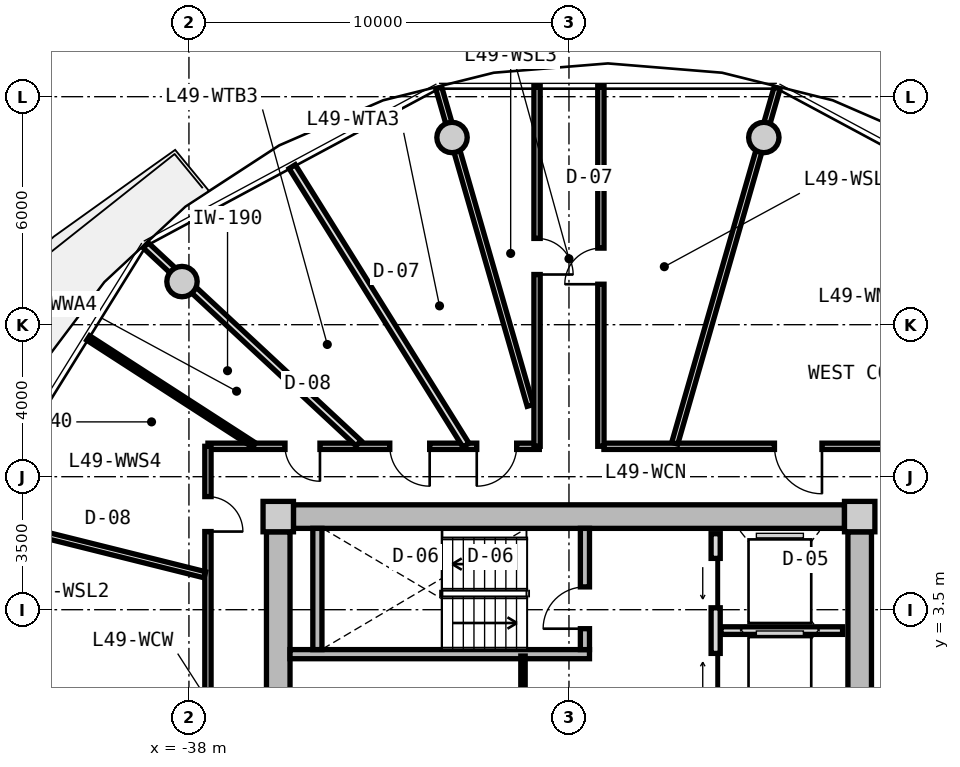
"""IFC4 building model, lengths in metres.
Left out: names, types, materials, properties, quantities, classifications, styles, units other than length and angle.
Written with IfcOpenShell. Run it as: python <this file> out.ifc"""

import sys

from ifc_helpers import new_model, si_unit, direction, frame, frame_2d, origin, origin_2d, place, context, subcontext, project, spatial, rectangle, circle, extrude, source, transform, mapped, element, fill, save


model = new_model("IFC4")
c1 = context("Model", 3, precision=1e-05, world=origin(), true_north=direction((0.0, 1.0)))
c2 = subcontext(c1, "Body", "Model", "MODEL_VIEW")
j1 = project(units=[si_unit("LENGTHUNIT", "METRE"), si_unit("PLANEANGLEUNIT", "RADIAN")], contexts=[c1])
p1 = place(None, origin())
s1 = spatial("IfcSite", under=j1, at=p1, CompositionType="ELEMENT")
p2 = place(p1, origin())
s2 = spatial("IfcBuilding", under=s1, at=p2, CompositionType="ELEMENT")
p3 = place(p2, frame((0.0, 0.0, 158.7)))
s3 = spatial("IfcBuildingStorey", under=s2, at=p3, CompositionType="ELEMENT", Elevation=158.7)
m1 = source(origin(), c2, "Body", "SweptSolid", [
    extrude(rectangle(XDim=0.8, YDim=0.8, at=origin_2d()), origin(), (0.0, 0.0, 1.0), 3.05),
])
for number, where, z_axis, x_axis in (
    (1, (-20.35, 5.95, 0.0), (0.0, 0.0, 1.0), (1.0, 0.0, 0.0)),
    (2, (-35.65, 5.95, 0.0), (0.0, 0.0, 1.0), (1.0, 0.0, 0.0)),
):
    element("IfcColumn", number, at=place(p3, frame(where, z_axis=z_axis, x_axis=x_axis)), inside=s3, PredefinedType="COLUMN", context=c2, shape_type="MappedRepresentation", body=[
        mapped(m1, transform((0.0, 0.0, 0.0), x_axis=(1.0, 0.0, 0.0), y_axis=(0.0, 1.0, 0.0), z_axis=(0.0, 0.0, 1.0), scale=1.0)),
    ])
m2 = source(origin(), c2, "Body", "SweptSolid", [
    extrude(rectangle(XDim=14.5, YDim=0.62, at=frame_2d((7.25, 0.0))), origin(), (0.0, 0.0, 1.0), 2.81),
])
p4 = place(p3, frame((-35.25, 5.95, 0.0), z_axis=(0.0, 0.0, 1.0), x_axis=(1.0, 0.0, 0.0)))
e3 = element("IfcWall", 3, at=p4, inside=s3, PredefinedType="SHEAR", context=c2, shape_type="MappedRepresentation", body=[
    mapped(m2, transform((0.0, 0.0, 0.0), x_axis=(1.0, 0.0, 0.0), y_axis=(0.0, 1.0, 0.0), z_axis=(0.0, 0.0, 1.0), scale=1.0)),
])
m3 = source(origin(), c2, "Body", "SweptSolid", [
    extrude(rectangle(XDim=11.1, YDim=0.62, at=frame_2d((5.55, 0.0))), origin(), (0.0, 0.0, 1.0), 2.81),
])
p5 = place(p3, frame((-35.65, -5.55, 0.0), z_axis=(0.0, 0.0, 1.0), x_axis=(0.0, 1.0, 0.0)))
e4 = element("IfcWall", 4, at=p5, inside=s3, PredefinedType="SHEAR", context=c2, shape_type="MappedRepresentation", body=[
    mapped(m3, transform((0.0, 0.0, 0.0), x_axis=(1.0, 0.0, 0.0), y_axis=(0.0, 1.0, 0.0), z_axis=(0.0, 0.0, 1.0), scale=1.0)),
])
p6 = place(p5, frame((3.8, 0.0, 0.0)))
e5 = element("IfcOpeningElement", 5, at=p6, cuts=e4, PredefinedType="OPENING", context=c2, shape_type="SweptSolid", body=[
    extrude(rectangle(XDim=1.2, YDim=2.15, at=frame_2d((0.6, 1.075))), frame((0.0, 0.32, 0.0), z_axis=(0.0, -1.0, 0.0), x_axis=(1.0, 0.0, 0.0)), (0.0, 0.0, 1.0), 0.64),
])
p7 = place(p3, frame((-20.35, 5.55, 0.0), z_axis=(0.0, 0.0, 1.0), x_axis=(0.0, -1.0, 0.0)))
e6 = element("IfcWall", 6, at=p7, inside=s3, PredefinedType="SHEAR", context=c2, shape_type="MappedRepresentation", body=[
    mapped(m3, transform((0.0, 0.0, 0.0), x_axis=(1.0, 0.0, 0.0), y_axis=(0.0, 1.0, 0.0), z_axis=(0.0, 0.0, 1.0), scale=1.0)),
])
p8 = place(p7, frame((5.65, 0.0, 0.0)))
e7 = element("IfcOpeningElement", 7, at=p8, cuts=e6, PredefinedType="OPENING", context=c2, shape_type="SweptSolid", body=[
    extrude(rectangle(XDim=1.2, YDim=2.15, at=frame_2d((0.6, 1.075))), frame((0.0, 0.32, 0.0), z_axis=(0.0, -1.0, 0.0), x_axis=(1.0, 0.0, 0.0)), (0.0, 0.0, 1.0), 0.64),
])
m4 = source(origin(), c2, "Body", "SweptSolid", [
    extrude(circle(Radius=0.4, at=origin_2d()), origin(), (0.0, 0.0, 1.0), 3.05),
])
for number, where, z_axis, x_axis in (
    (8, (-22.873, 15.926, 0.0), (0.0, 0.0, 1.0), (1.0, 0.0, 0.0)),
    (9, (-31.077, 15.926, 0.0), (0.0, 0.0, 1.0), (1.0, 0.0, 0.0)),
    (10, (-38.183, 12.135, 0.0), (0.0, 0.0, 1.0), (1.0, 0.0, 0.0)),
):
    element("IfcColumn", number, at=place(p3, frame(where, z_axis=z_axis, x_axis=x_axis)), inside=s3, PredefinedType="COLUMN", context=c2, shape_type="MappedRepresentation", body=[
        mapped(m4, transform((0.0, 0.0, 0.0), x_axis=(1.0, 0.0, 0.0), y_axis=(0.0, 1.0, 0.0), z_axis=(0.0, 0.0, 1.0), scale=1.0)),
    ])
m5 = source(origin(), c2, "Body", "SweptSolid", [
    extrude(rectangle(XDim=7.88, YDim=0.24, at=frame_2d((3.94, 0.0))), origin(), (0.0, 0.0, 1.0), 2.81),
])
p9 = place(p3, frame((-35.34, 2.33, 0.0), z_axis=(0.0, 0.0, 1.0), x_axis=(1.0, 0.0, 0.0)))
e11 = element("IfcWall", 11, at=p9, inside=s3, PredefinedType="PARTITIONING", context=c2, shape_type="MappedRepresentation", body=[
    mapped(m5, transform((0.0, 0.0, 0.0), x_axis=(1.0, 0.0, 0.0), y_axis=(0.0, 1.0, 0.0), z_axis=(0.0, 0.0, 1.0), scale=1.0)),
])
m6 = source(origin(), c2, "Body", "SweptSolid", [
    extrude(rectangle(XDim=3.19, YDim=0.24, at=frame_2d((1.595, 0.0))), origin(), (0.0, 0.0, 1.0), 2.81),
])
p10 = place(p3, frame((-34.62, 2.45, 0.0), z_axis=(0.0, 0.0, 1.0), x_axis=(0.0, 1.0, 0.0)))
e12 = element("IfcWall", 12, at=p10, inside=s3, PredefinedType="PARTITIONING", context=c2, shape_type="MappedRepresentation", body=[
    mapped(m6, transform((0.0, 0.0, 0.0), x_axis=(1.0, 0.0, 0.0), y_axis=(0.0, 1.0, 0.0), z_axis=(0.0, 0.0, 1.0), scale=1.0)),
])
p11 = place(p3, frame((-27.58, 2.45, 0.0), z_axis=(0.0, 0.0, 1.0), x_axis=(0.0, 1.0, 0.0)))
e13 = element("IfcWall", 13, at=p11, inside=s3, PredefinedType="PARTITIONING", context=c2, shape_type="MappedRepresentation", body=[
    mapped(m6, transform((0.0, 0.0, 0.0), x_axis=(1.0, 0.0, 0.0), y_axis=(0.0, 1.0, 0.0), z_axis=(0.0, 0.0, 1.0), scale=1.0)),
])
p12 = place(p11, frame((0.55, 0.0, 0.0)))
e14 = element("IfcOpeningElement", 14, at=p12, cuts=e13, PredefinedType="OPENING", context=c2, shape_type="SweptSolid", body=[
    extrude(rectangle(XDim=1.1, YDim=2.15, at=frame_2d((0.55, 1.075))), frame((0.0, 0.13, 0.0), z_axis=(0.0, -1.0, 0.0), x_axis=(1.0, 0.0, 0.0)), (0.0, 0.0, 1.0), 0.26),
])
m7 = source(origin(), c2, "Body", "SweptSolid", [
    extrude(rectangle(XDim=5.0, YDim=0.24, at=frame_2d((2.5, 0.0))), origin(), (0.0, 0.0, 1.0), 2.795),
])
p13 = place(p3, frame((-24.14, 0.5, 0.0), z_axis=(0.0, 0.0, 1.0), x_axis=(0.0, 1.0, 0.0)))
e15 = element("IfcWall", 15, at=p13, inside=s3, PredefinedType="PARTITIONING", context=c2, shape_type="MappedRepresentation", body=[
    mapped(m7, transform((0.0, 0.0, 0.0), x_axis=(1.0, 0.0, 0.0), y_axis=(0.0, 1.0, 0.0), z_axis=(0.0, 0.0, 1.0), scale=1.0)),
])
p14 = place(p13, frame((3.05, 0.0, 0.0)))
e16 = element("IfcOpeningElement", 16, at=p14, cuts=e15, PredefinedType="OPENING", context=c2, shape_type="SweptSolid", body=[
    extrude(rectangle(XDim=1.3, YDim=2.2, at=frame_2d((0.65, 1.1))), frame((0.0, 0.13, 0.0), z_axis=(0.0, -1.0, 0.0), x_axis=(1.0, 0.0, 0.0)), (0.0, 0.0, 1.0), 0.26),
])
p15 = place(p13, frame((0.55, 0.0, 0.0)))
e17 = element("IfcOpeningElement", 17, at=p15, cuts=e15, PredefinedType="OPENING", context=c2, shape_type="SweptSolid", body=[
    extrude(rectangle(XDim=1.3, YDim=2.2, at=frame_2d((0.65, 1.1))), frame((0.0, 0.13, 0.0), z_axis=(0.0, -1.0, 0.0), x_axis=(1.0, 0.0, 0.0)), (0.0, 0.0, 1.0), 0.26),
])
m8 = source(origin(), c2, "Body", "SweptSolid", [
    extrude(rectangle(XDim=3.2, YDim=0.2, at=frame_2d((1.6, 0.0))), origin(), (0.0, 0.0, 1.0), 2.795),
])
p16 = place(p3, frame((-24.0, 2.95, 0.0), z_axis=(0.0, 0.0, 1.0), x_axis=(1.0, 0.0, 0.0)))
e18 = element("IfcWall", 18, at=p16, inside=s3, PredefinedType="PARTITIONING", context=c2, shape_type="MappedRepresentation", body=[
    mapped(m8, transform((0.0, 0.0, 0.0), x_axis=(1.0, 0.0, 0.0), y_axis=(0.0, 1.0, 0.0), z_axis=(0.0, 0.0, 1.0), scale=1.0)),
])
m9 = source(origin(), c2, "Body", "SweptSolid", [
    extrude(rectangle(XDim=2.33, YDim=0.115, at=frame_2d((1.165, 0.0))), origin(), (0.0, 0.0, 1.0), 2.795),
])
p17 = place(p3, frame((-29.21, -0.05, 0.0), z_axis=(0.0, 0.0, 1.0), x_axis=(0.0, 1.0, 0.0)))
e19 = element("IfcWall", 19, at=p17, inside=s3, PredefinedType="PARTITIONING", context=c2, shape_type="MappedRepresentation", body=[
    mapped(m9, transform((0.0, 0.0, 0.0), x_axis=(1.0, 0.0, 0.0), y_axis=(0.0, 1.0, 0.0), z_axis=(0.0, 0.0, 1.0), scale=1.0)),
])
m10 = source(origin(), c2, "Body", "SweptSolid", [
    extrude(rectangle(XDim=8.719, YDim=0.165, at=frame_2d((4.36, 0.0))), origin(), (0.0, 0.0, 1.0), 2.795),
])
p18 = place(p3, frame((-37.5, 7.8, 0.0), z_axis=(0.0, 0.0, 1.0), x_axis=(1.0, 0.0, 0.0)))
e20 = element("IfcWall", 20, at=p18, inside=s3, PredefinedType="PARTITIONING", context=c2, shape_type="MappedRepresentation", body=[
    mapped(m10, transform((0.0, 0.0, 0.0), x_axis=(1.0, 0.0, 0.0), y_axis=(0.0, 1.0, 0.0), z_axis=(0.0, 0.0, 1.0), scale=1.0)),
])
p19 = place(p18, frame((7.073, 0.0, 0.0)))
e21 = element("IfcOpeningElement", 21, at=p19, cuts=e20, PredefinedType="OPENING", context=c2, shape_type="SweptSolid", body=[
    extrude(rectangle(XDim=1.05, YDim=2.15, at=frame_2d((0.525, 1.075))), frame((0.0, 0.093, 0.0), z_axis=(0.0, -1.0, 0.0), x_axis=(1.0, 0.0, 0.0)), (0.0, 0.0, 1.0), 0.185),
])
p20 = place(p18, frame((4.785, 0.0, 0.0)))
e22 = element("IfcOpeningElement", 22, at=p20, cuts=e20, PredefinedType="OPENING", context=c2, shape_type="SweptSolid", body=[
    extrude(rectangle(XDim=1.05, YDim=2.15, at=frame_2d((0.525, 1.075))), frame((0.0, 0.093, 0.0), z_axis=(0.0, -1.0, 0.0), x_axis=(1.0, 0.0, 0.0)), (0.0, 0.0, 1.0), 0.185),
])
p21 = place(p18, frame((2.028, 0.0, 0.0)))
e23 = element("IfcOpeningElement", 23, at=p21, cuts=e20, PredefinedType="OPENING", context=c2, shape_type="SweptSolid", body=[
    extrude(rectangle(XDim=0.92, YDim=2.1, at=frame_2d((0.46, 1.05))), frame((0.0, 0.093, 0.0), z_axis=(0.0, -1.0, 0.0), x_axis=(1.0, 0.0, 0.0)), (0.0, 0.0, 1.0), 0.185),
])
m11 = source(origin(), c2, "Body", "SweptSolid", [
    extrude(rectangle(XDim=8.58, YDim=0.165, at=frame_2d((4.29, 0.0))), origin(), (0.0, 0.0, 1.0), 2.795),
])
p22 = place(p3, frame((-27.08, 7.8, 0.0), z_axis=(0.0, 0.0, 1.0), x_axis=(1.0, 0.0, 0.0)))
e24 = element("IfcWall", 24, at=p22, inside=s3, PredefinedType="PARTITIONING", context=c2, shape_type="MappedRepresentation", body=[
    mapped(m11, transform((0.0, 0.0, 0.0), x_axis=(1.0, 0.0, 0.0), y_axis=(0.0, 1.0, 0.0), z_axis=(0.0, 0.0, 1.0), scale=1.0)),
])
p23 = place(p22, frame((4.487, 0.0, 0.0)))
e25 = element("IfcOpeningElement", 25, at=p23, cuts=e24, PredefinedType="OPENING", context=c2, shape_type="SweptSolid", body=[
    extrude(rectangle(XDim=1.25, YDim=2.2, at=frame_2d((0.625, 1.1))), frame((0.0, 0.093, 0.0), z_axis=(0.0, -1.0, 0.0), x_axis=(1.0, 0.0, 0.0)), (0.0, 0.0, 1.0), 0.185),
])
m12 = source(origin(), c2, "Body", "SweptSolid", [
    extrude(rectangle(XDim=6.88, YDim=0.165, at=frame_2d((3.44, 0.0))), origin(), (0.0, 0.0, 1.0), 2.795),
])
p24 = place(p3, frame((-37.5, 0.92, 0.0), z_axis=(0.0, 0.0, 1.0), x_axis=(0.0, 1.0, 0.0)))
e26 = element("IfcWall", 26, at=p24, inside=s3, PredefinedType="PARTITIONING", context=c2, shape_type="MappedRepresentation", body=[
    mapped(m12, transform((0.0, 0.0, 0.0), x_axis=(1.0, 0.0, 0.0), y_axis=(0.0, 1.0, 0.0), z_axis=(0.0, 0.0, 1.0), scale=1.0)),
])
p25 = place(p24, frame((4.636, 0.0, 0.0)))
e27 = element("IfcOpeningElement", 27, at=p25, cuts=e26, PredefinedType="OPENING", context=c2, shape_type="SweptSolid", body=[
    extrude(rectangle(XDim=0.92, YDim=2.1, at=frame_2d((0.46, 1.05))), frame((0.0, 0.093, 0.0), z_axis=(0.0, -1.0, 0.0), x_axis=(1.0, 0.0, 0.0)), (0.0, 0.0, 1.0), 0.185),
])
m13 = source(origin(), c2, "Body", "SweptSolid", [
    extrude(rectangle(XDim=9.73, YDim=0.165, at=frame_2d((4.865, 0.0))), origin(), (0.0, 0.0, 1.0), 2.345),
])
p26 = place(p3, frame((-25.217, 7.88, 0.0), z_axis=(0.0, 0.0, 1.0), x_axis=(0.27679492614, 0.960929013436, 0.0)))
e28 = element("IfcWall", 28, at=p26, inside=s3, PredefinedType="PARTITIONING", context=c2, shape_type="MappedRepresentation", body=[
    mapped(m13, transform((0.0, 0.0, 0.0), x_axis=(1.0, 0.0, 0.0), y_axis=(0.0, 1.0, 0.0), z_axis=(0.0, 0.0, 1.0), scale=1.0)),
])
m14 = source(origin(), c2, "Body", "SweptSolid", [
    extrude(rectangle(XDim=8.695, YDim=0.165, at=frame_2d((4.348, 0.0))), origin(), (0.0, 0.0, 1.0), 2.345),
])
p27 = place(p3, frame((-29.02, 8.875, 0.0), z_axis=(0.0, 0.0, 1.0), x_axis=(-0.276797231892, 0.960928349263, 0.0)))
e29 = element("IfcWall", 29, at=p27, inside=s3, PredefinedType="PARTITIONING", context=c2, shape_type="MappedRepresentation", body=[
    mapped(m14, transform((0.0, 0.0, 0.0), x_axis=(1.0, 0.0, 0.0), y_axis=(0.0, 1.0, 0.0), z_axis=(0.0, 0.0, 1.0), scale=1.0)),
])
m15 = source(origin(), c2, "Body", "SweptSolid", [
    extrude(rectangle(XDim=6.193, YDim=0.165, at=frame_2d((3.096, 0.0))), origin(), (0.0, 0.0, 1.0), 2.345),
])
p28 = place(p3, frame((-37.58, 4.419, 0.0), z_axis=(0.0, 0.0, 1.0), x_axis=(-0.970309243466, 0.241867674657, 0.0)))
e30 = element("IfcWall", 30, at=p28, inside=s3, PredefinedType="PARTITIONING", context=c2, shape_type="MappedRepresentation", body=[
    mapped(m15, transform((0.0, 0.0, 0.0), x_axis=(1.0, 0.0, 0.0), y_axis=(0.0, 1.0, 0.0), z_axis=(0.0, 0.0, 1.0), scale=1.0)),
])
m16 = source(origin(), c2, "Body", "SweptSolid", [
    extrude(rectangle(XDim=9.48, YDim=0.165, at=frame_2d((4.74, 0.0))), origin(), (0.0, 0.0, 1.0), 2.795),
])
p29 = place(p3, frame((-28.84, 7.8, 0.0), z_axis=(0.0, 0.0, 1.0), x_axis=(0.0, 1.0, 0.0)))
e31 = element("IfcWall", 31, at=p29, inside=s3, PredefinedType="PARTITIONING", context=c2, shape_type="MappedRepresentation", body=[
    mapped(m16, transform((0.0, 0.0, 0.0), x_axis=(1.0, 0.0, 0.0), y_axis=(0.0, 1.0, 0.0), z_axis=(0.0, 0.0, 1.0), scale=1.0)),
])
p30 = place(p29, frame((4.521, 0.0, 0.0)))
e32 = element("IfcOpeningElement", 32, at=p30, cuts=e31, PredefinedType="OPENING", context=c2, shape_type="SweptSolid", body=[
    extrude(rectangle(XDim=0.95, YDim=2.1, at=frame_2d((0.475, 1.05))), frame((0.0, 0.093, 0.0), z_axis=(0.0, -1.0, 0.0), x_axis=(1.0, 0.0, 0.0)), (0.0, 0.0, 1.0), 0.185),
])
p31 = place(p3, frame((-27.16, 17.28, 0.0), z_axis=(0.0, 0.0, 1.0), x_axis=(0.0, -1.0, 0.0)))
e33 = element("IfcWall", 33, at=p31, inside=s3, PredefinedType="PARTITIONING", context=c2, shape_type="MappedRepresentation", body=[
    mapped(m16, transform((0.0, 0.0, 0.0), x_axis=(1.0, 0.0, 0.0), y_axis=(0.0, 1.0, 0.0), z_axis=(0.0, 0.0, 1.0), scale=1.0)),
])
p32 = place(p31, frame((4.265, 0.0, 0.0)))
e34 = element("IfcOpeningElement", 34, at=p32, cuts=e33, PredefinedType="OPENING", context=c2, shape_type="SweptSolid", body=[
    extrude(rectangle(XDim=0.95, YDim=2.1, at=frame_2d((0.475, 1.05))), frame((0.0, 0.093, 0.0), z_axis=(0.0, -1.0, 0.0), x_axis=(1.0, 0.0, 0.0)), (0.0, 0.0, 1.0), 0.185),
])
m17 = source(origin(), c2, "Body", "SweptSolid", [
    extrude(rectangle(XDim=7.648, YDim=0.19, at=frame_2d((3.824, 0.0))), origin(), (0.0, 0.0, 1.0), 2.345),
])
p33 = place(p3, frame((-33.538, 7.88, 0.0), z_axis=(0.0, 0.0, 1.0), x_axis=(-0.732167856666, 0.681124239522, 0.0)))
e35 = element("IfcWall", 35, at=p33, inside=s3, PredefinedType="PARTITIONING", context=c2, shape_type="MappedRepresentation", body=[
    mapped(m17, transform((0.0, 0.0, 0.0), x_axis=(1.0, 0.0, 0.0), y_axis=(0.0, 1.0, 0.0), z_axis=(0.0, 0.0, 1.0), scale=1.0)),
])
m18 = source(origin(), c2, "Body", "SweptSolid", [
    extrude(rectangle(XDim=8.638, YDim=0.19, at=frame_2d((4.319, 0.0))), origin(), (0.0, 0.0, 1.0), 2.795),
])
p34 = place(p3, frame((-30.711, 7.83, 0.0), z_axis=(0.0, 0.0, 1.0), x_axis=(-0.529150133108, 0.848528217935, 0.0)))
e36 = element("IfcWall", 36, at=p34, inside=s3, PredefinedType="PARTITIONING", context=c2, shape_type="MappedRepresentation", body=[
    mapped(m18, transform((0.0, 0.0, 0.0), x_axis=(1.0, 0.0, 0.0), y_axis=(0.0, 1.0, 0.0), z_axis=(0.0, 0.0, 1.0), scale=1.0)),
])
m19 = source(origin(), c2, "Body", "SweptSolid", [
    extrude(rectangle(XDim=5.197, YDim=0.14, at=frame_2d((2.598, 0.0))), origin(), (0.0, 0.0, 1.0), 2.795),
])
p35 = place(p3, frame((-36.286, 7.83, 0.0), z_axis=(0.0, 0.0, 1.0), x_axis=(-0.839929187515, 0.542696010637, 0.0)))
e37 = element("IfcWall", 37, at=p35, inside=s3, PredefinedType="PARTITIONING", context=c2, shape_type="MappedRepresentation", body=[
    mapped(m19, transform((0.0, 0.0, 0.0), x_axis=(1.0, 0.0, 0.0), y_axis=(0.0, 1.0, 0.0), z_axis=(0.0, 0.0, 1.0), scale=1.0)),
])
m20 = source(origin(), c2, "Body", "SweptSolid", [
    extrude(rectangle(XDim=1.1, YDim=2.15, at=frame_2d((0.55, 1.075))), frame((0.0, 0.025, 0.0), z_axis=(0.0, -1.0, 0.0), x_axis=(1.0, 0.0, 0.0)), (0.0, 0.0, 1.0), 0.05),
])
p36 = place(p12, origin())
e38 = element("IfcDoor", 38, at=p36, inside=s3, OperationType="SINGLE_SWING_LEFT", PredefinedType="DOOR", context=c2, shape_type="MappedRepresentation", body=[
    mapped(m20, transform((0.0, 0.0, 0.0), x_axis=(1.0, 0.0, 0.0), y_axis=(0.0, 1.0, 0.0), z_axis=(0.0, 0.0, 1.0), scale=1.0)),
])
fill(e14, e38)
m21 = source(origin(), c2, "Body", "SweptSolid", [
    extrude(rectangle(XDim=1.3, YDim=2.2, at=frame_2d((0.65, 1.1))), frame((0.0, 0.025, 0.0), z_axis=(0.0, -1.0, 0.0), x_axis=(1.0, 0.0, 0.0)), (0.0, 0.0, 1.0), 0.05),
])
p37 = place(p14, origin())
e39 = element("IfcDoor", 39, at=p37, inside=s3, OperationType="SLIDING_TO_LEFT", PredefinedType="DOOR", context=c2, shape_type="MappedRepresentation", body=[
    mapped(m21, transform((0.0, 0.0, 0.0), x_axis=(1.0, 0.0, 0.0), y_axis=(0.0, 1.0, 0.0), z_axis=(0.0, 0.0, 1.0), scale=1.0)),
])
fill(e16, e39)
p38 = place(p15, origin())
e40 = element("IfcDoor", 40, at=p38, inside=s3, OperationType="SLIDING_TO_RIGHT", PredefinedType="DOOR", context=c2, shape_type="MappedRepresentation", body=[
    mapped(m21, transform((0.0, 0.0, 0.0), x_axis=(1.0, 0.0, 0.0), y_axis=(0.0, 1.0, 0.0), z_axis=(0.0, 0.0, 1.0), scale=1.0)),
])
fill(e17, e40)
m22 = source(origin(), c2, "Body", "SweptSolid", [
    extrude(rectangle(XDim=0.95, YDim=2.1, at=frame_2d((0.475, 1.05))), frame((0.0, 0.025, 0.0), z_axis=(0.0, -1.0, 0.0), x_axis=(1.0, 0.0, 0.0)), (0.0, 0.0, 1.0), 0.05),
])
p39 = place(p30, frame((0.95, 0.0, 0.0), z_axis=(0.0, 0.0, 1.0), x_axis=(-1.0, 0.0, 0.0)))
e41 = element("IfcDoor", 41, at=p39, inside=s3, OperationType="SINGLE_SWING_RIGHT", PredefinedType="DOOR", context=c2, shape_type="MappedRepresentation", body=[
    mapped(m22, transform((0.0, 0.0, 0.0), x_axis=(1.0, 0.0, 0.0), y_axis=(0.0, 1.0, 0.0), z_axis=(0.0, 0.0, 1.0), scale=1.0)),
])
fill(e32, e41)
p40 = place(p32, frame((0.95, 0.0, 0.0), z_axis=(0.0, 0.0, 1.0), x_axis=(-1.0, 0.0, 0.0)))
e42 = element("IfcDoor", 42, at=p40, inside=s3, OperationType="SINGLE_SWING_LEFT", PredefinedType="DOOR", context=c2, shape_type="MappedRepresentation", body=[
    mapped(m22, transform((0.0, 0.0, 0.0), x_axis=(1.0, 0.0, 0.0), y_axis=(0.0, 1.0, 0.0), z_axis=(0.0, 0.0, 1.0), scale=1.0)),
])
fill(e34, e42)
m23 = source(origin(), c2, "Body", "SweptSolid", [
    extrude(rectangle(XDim=1.25, YDim=2.2, at=frame_2d((0.625, 1.1))), frame((0.0, 0.025, 0.0), z_axis=(0.0, -1.0, 0.0), x_axis=(1.0, 0.0, 0.0)), (0.0, 0.0, 1.0), 0.05),
])
p41 = place(p23, frame((1.25, 0.0, 0.0), z_axis=(0.0, 0.0, 1.0), x_axis=(-1.0, 0.0, 0.0)))
e43 = element("IfcDoor", 43, at=p41, inside=s3, OperationType="SINGLE_SWING_LEFT", PredefinedType="DOOR", context=c2, shape_type="MappedRepresentation", body=[
    mapped(m23, transform((0.0, 0.0, 0.0), x_axis=(1.0, 0.0, 0.0), y_axis=(0.0, 1.0, 0.0), z_axis=(0.0, 0.0, 1.0), scale=1.0)),
])
fill(e25, e43)
m24 = source(origin(), c2, "Body", "SweptSolid", [
    extrude(rectangle(XDim=1.05, YDim=2.15, at=frame_2d((0.525, 1.075))), frame((0.0, 0.025, 0.0), z_axis=(0.0, -1.0, 0.0), x_axis=(1.0, 0.0, 0.0)), (0.0, 0.0, 1.0), 0.05),
])
p42 = place(p19, frame((1.05, 0.0, 0.0), z_axis=(0.0, 0.0, 1.0), x_axis=(-1.0, 0.0, 0.0)))
e44 = element("IfcDoor", 44, at=p42, inside=s3, OperationType="SINGLE_SWING_RIGHT", PredefinedType="DOOR", context=c2, shape_type="MappedRepresentation", body=[
    mapped(m24, transform((0.0, 0.0, 0.0), x_axis=(1.0, 0.0, 0.0), y_axis=(0.0, 1.0, 0.0), z_axis=(0.0, 0.0, 1.0), scale=1.0)),
])
fill(e21, e44)
p43 = place(p20, frame((1.05, 0.0, 0.0), z_axis=(0.0, 0.0, 1.0), x_axis=(-1.0, 0.0, 0.0)))
e45 = element("IfcDoor", 45, at=p43, inside=s3, OperationType="SINGLE_SWING_LEFT", PredefinedType="DOOR", context=c2, shape_type="MappedRepresentation", body=[
    mapped(m24, transform((0.0, 0.0, 0.0), x_axis=(1.0, 0.0, 0.0), y_axis=(0.0, 1.0, 0.0), z_axis=(0.0, 0.0, 1.0), scale=1.0)),
])
fill(e22, e45)
m25 = source(origin(), c2, "Body", "SweptSolid", [
    extrude(rectangle(XDim=0.92, YDim=2.1, at=frame_2d((0.46, 1.05))), frame((0.0, 0.025, 0.0), z_axis=(0.0, -1.0, 0.0), x_axis=(1.0, 0.0, 0.0)), (0.0, 0.0, 1.0), 0.05),
])
p44 = place(p21, frame((0.92, 0.0, 0.0), z_axis=(0.0, 0.0, 1.0), x_axis=(-1.0, 0.0, 0.0)))
e46 = element("IfcDoor", 46, at=p44, inside=s3, OperationType="SINGLE_SWING_LEFT", PredefinedType="DOOR", context=c2, shape_type="MappedRepresentation", body=[
    mapped(m25, transform((0.0, 0.0, 0.0), x_axis=(1.0, 0.0, 0.0), y_axis=(0.0, 1.0, 0.0), z_axis=(0.0, 0.0, 1.0), scale=1.0)),
])
fill(e23, e46)
p45 = place(p25, frame((0.92, 0.0, 0.0), z_axis=(0.0, 0.0, 1.0), x_axis=(-1.0, 0.0, 0.0)))
e47 = element("IfcDoor", 47, at=p45, inside=s3, OperationType="SINGLE_SWING_RIGHT", PredefinedType="DOOR", context=c2, shape_type="MappedRepresentation", body=[
    mapped(m25, transform((0.0, 0.0, 0.0), x_axis=(1.0, 0.0, 0.0), y_axis=(0.0, 1.0, 0.0), z_axis=(0.0, 0.0, 1.0), scale=1.0)),
])
fill(e27, e47)
save(model, sys.argv[1])
